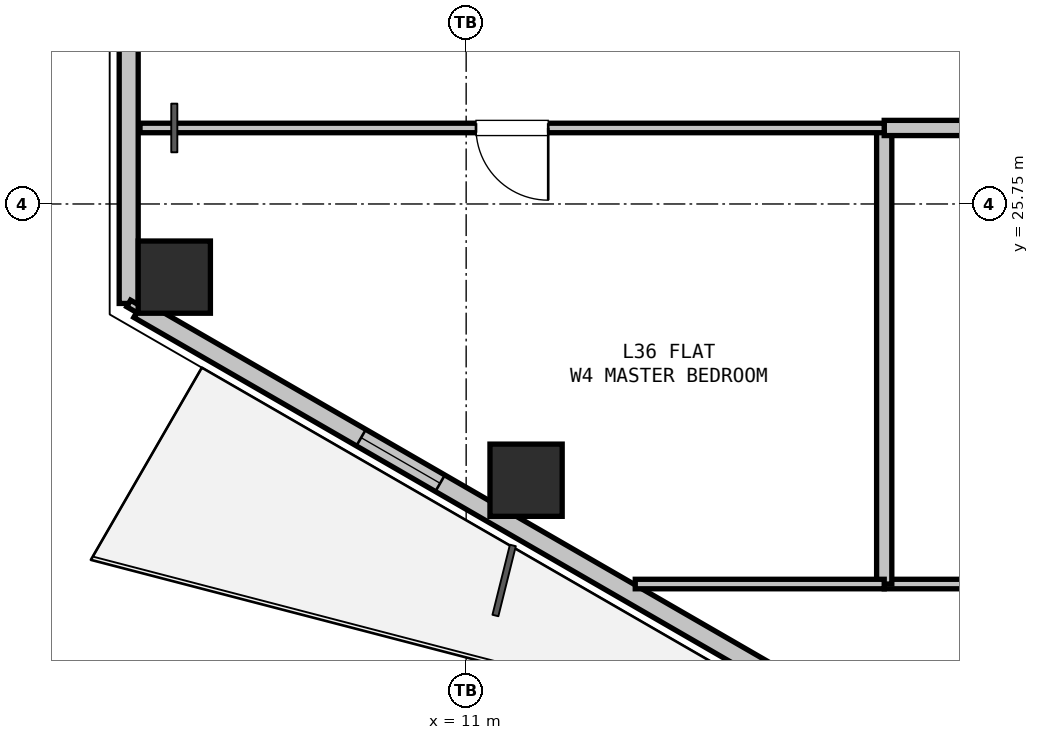
"""IFC4 building model, lengths in metres.
Left out: names, types, materials, properties, quantities, classifications, styles, units other than length and angle.
Written with IfcOpenShell. Run it as: python <this file> out.ifc"""

import sys

from ifc_helpers import new_model, si_unit, direction, frame, frame_2d, origin, origin_2d, place, context, subcontext, project, spatial, rectangle, hollow_rectangle, extrude, element, fill, save


model = new_model("IFC4")
c1 = context("Model", 3, precision=1e-05, world=origin(), true_north=direction((0.0, 1.0)))
c2 = subcontext(c1, "Body", "Model", "MODEL_VIEW")
j1 = project(units=[si_unit("LENGTHUNIT", "METRE"), si_unit("PLANEANGLEUNIT", "RADIAN")], contexts=[c1])
p1 = place(None, origin())
s1 = spatial("IfcSite", under=j1, at=p1, CompositionType="ELEMENT")
p2 = place(p1, origin())
s2 = spatial("IfcBuilding", under=s1, at=p2, CompositionType="ELEMENT")
p3 = place(p2, frame((0.0, 0.0, 131.1)))
s3 = spatial("IfcBuildingStorey", under=s2, at=p3, CompositionType="ELEMENT", Elevation=131.1)
for number, where, z_axis, x_axis in (
    (1, (11.788, 22.116, 0.0), (0.0, 0.0, 1.0), (1.0, 0.0, 0.0)),
    (2, (7.16, 24.788, 0.0), (0.0, 0.0, 1.0), (1.0, 0.0, 0.0)),
):
    element("IfcColumn", number, at=place(p3, frame(where, z_axis=z_axis, x_axis=x_axis)), inside=s3, PredefinedType="COLUMN", context=c2, shape_type="SweptSolid", body=[
        extrude(hollow_rectangle(XDim=0.95, YDim=0.95, WallThickness=0.028, at=origin_2d()), origin(), (0.0, 0.0, 1.0), 3.3),
    ])
p4 = place(p3, frame((6.56, 24.441, 0.0), z_axis=(0.0, 0.0, 1.0), x_axis=(0.0, 1.0, 0.0)))
e3 = element("IfcWall", 3, at=p4, inside=s3, PredefinedType="SOLIDWALL", context=c2, shape_type="SweptSolid", body=[
    extrude(rectangle(XDim=4.617, YDim=0.25, at=frame_2d((2.309, 0.0))), origin(), (0.0, 0.0, 1.0), 2.68),
])
p5 = place(p3, frame((16.378, 18.773, 0.0), z_axis=(0.0, 0.0, 1.0), x_axis=(-0.866027848477, 0.499995765644, 0.0)))
e4 = element("IfcWall", 4, at=p5, inside=s3, PredefinedType="SOLIDWALL", context=c2, shape_type="SweptSolid", body=[
    extrude(rectangle(XDim=11.186, YDim=0.25, at=frame_2d((5.593, 0.0))), origin(), (0.0, 0.0, 1.0), 2.68),
])
p6 = place(p5, frame((6.605, 0.0, 0.9)))
e5 = element("IfcOpeningElement", 5, at=p6, cuts=e4, PredefinedType="OPENING", context=c2, shape_type="SweptSolid", body=[
    extrude(rectangle(XDim=1.2, YDim=1.4, at=frame_2d((0.6, 0.7))), frame((0.0, 0.135, 0.0), z_axis=(0.0, -1.0, 0.0), x_axis=(1.0, 0.0, 0.0)), (0.0, 0.0, 1.0), 0.27),
])
p7 = place(p3, frame((20.0, 20.75, 0.0), z_axis=(0.0, 0.0, 1.0), x_axis=(-1.0, 0.0, 0.0)))
e6 = element("IfcWall", 6, at=p7, inside=s3, PredefinedType="PARTITIONING", context=c2, shape_type="SweptSolid", body=[
    extrude(rectangle(XDim=3.5, YDim=0.125, at=frame_2d((1.75, 0.0))), origin(), (0.0, 0.0, 1.0), 3.06),
])
p8 = place(p3, frame((16.5, 20.75, 0.0), z_axis=(0.0, 0.0, 1.0), x_axis=(0.0, 1.0, 0.0)))
e7 = element("IfcWall", 7, at=p8, inside=s3, PredefinedType="PARTITIONING", context=c2, shape_type="SweptSolid", body=[
    extrude(rectangle(XDim=6.0, YDim=0.2, at=frame_2d((3.0, 0.0))), origin(), (0.0, 0.0, 1.0), 2.433),
])
p9 = place(p3, frame((16.5, 26.75, 0.0), z_axis=(0.0, 0.0, 1.0), x_axis=(1.0, 0.0, 0.0)))
e8 = element("IfcWall", 8, at=p9, inside=s3, PredefinedType="PARTITIONING", context=c2, shape_type="SweptSolid", body=[
    extrude(rectangle(XDim=5.45, YDim=0.2, at=frame_2d((2.725, 0.0))), origin(), (0.0, 0.0, 1.0), 2.508),
])
p10 = place(p3, frame((16.5, 26.75, 0.0), z_axis=(0.0, 0.0, 1.0), x_axis=(-1.0, 0.0, 0.0)))
e9 = element("IfcWall", 9, at=p10, inside=s3, PredefinedType="PARTITIONING", context=c2, shape_type="SweptSolid", body=[
    extrude(rectangle(XDim=9.791, YDim=0.125, at=frame_2d((4.896, 0.0))), origin(), (0.0, 0.0, 1.0), 2.724),
])
p11 = place(p10, frame((4.42, 0.0, 0.0)))
e10 = element("IfcOpeningElement", 10, at=p11, cuts=e9, PredefinedType="OPENING", context=c2, shape_type="SweptSolid", body=[
    extrude(rectangle(XDim=0.95, YDim=2.1, at=frame_2d((0.475, 1.05))), frame((0.0, 0.073, 0.0), z_axis=(0.0, -1.0, 0.0), x_axis=(1.0, 0.0, 0.0)), (0.0, 0.0, 1.0), 0.145),
])
p12 = place(p3, frame((16.5, 20.75, 0.0), z_axis=(0.0, 0.0, 1.0), x_axis=(-1.0, 0.0, 0.0)))
e11 = element("IfcWall", 11, at=p12, inside=s3, PredefinedType="PARTITIONING", context=c2, shape_type="SweptSolid", body=[
    extrude(rectangle(XDim=3.275, YDim=0.125, at=frame_2d((1.638, 0.0))), origin(), (0.0, 0.0, 1.0), 2.365),
])
p13 = place(p3, frame((6.69, 24.366, 0.0), z_axis=(0.0, 0.0, 1.0), x_axis=(-0.866131372301, 0.499816412211, 0.0)))
e12 = element("IfcWall", 12, at=p13, inside=s3, PredefinedType="PARTITIONING", context=c2, shape_type="SweptSolid", body=[
    extrude(rectangle(XDim=0.15, YDim=0.1, at=frame_2d((0.075, 0.0))), origin(), (0.0, 0.0, 1.0), 3.06),
])
p14 = place(p6, origin())
e13 = element("IfcWindow", 13, at=p14, inside=s3, PartitioningType="SINGLE_PANEL", PredefinedType="WINDOW", context=c2, shape_type="SweptSolid", body=[
    extrude(rectangle(XDim=1.2, YDim=1.4, at=frame_2d((0.6, 0.7))), frame((0.0, 0.03, 0.0), z_axis=(0.0, -1.0, 0.0), x_axis=(1.0, 0.0, 0.0)), (0.0, 0.0, 1.0), 0.06),
])
fill(e5, e13)
p15 = place(p11, origin())
e14 = element("IfcDoor", 14, at=p15, inside=s3, OperationType="SINGLE_SWING_LEFT", PredefinedType="DOOR", context=c2, shape_type="SweptSolid", body=[
    extrude(rectangle(XDim=0.95, YDim=2.1, at=frame_2d((0.475, 1.05))), frame((0.0, 0.025, 0.0), z_axis=(0.0, -1.0, 0.0), x_axis=(1.0, 0.0, 0.0)), (0.0, 0.0, 1.0), 0.05),
])
fill(e10, e14)
save(model, sys.argv[1])
